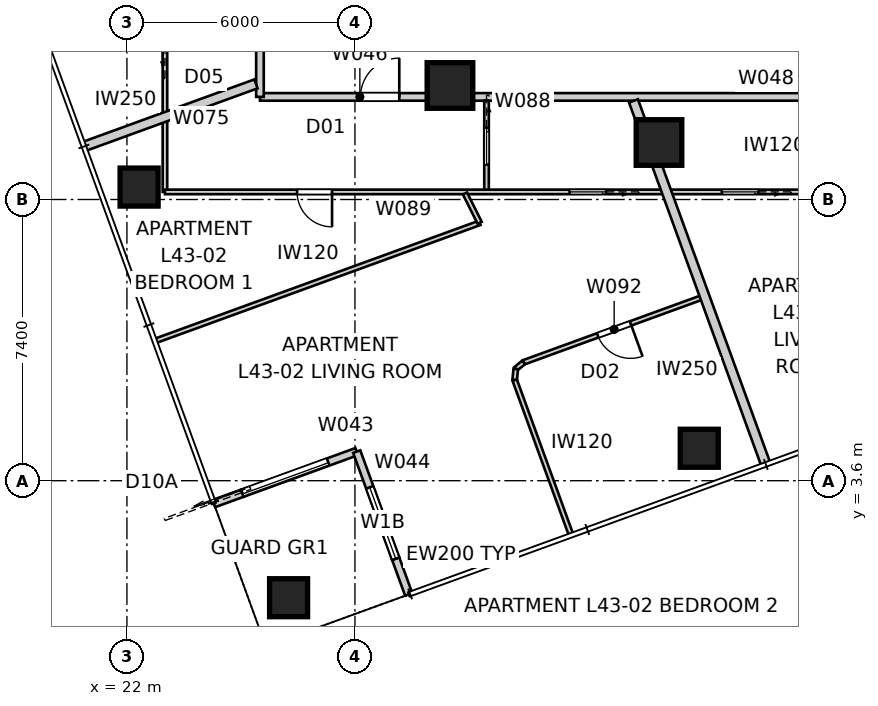
"""IFC4 building model, lengths in metres.
Left out: names, types, materials, properties, quantities, classifications, styles, units other than length and angle.
Written with IfcOpenShell. Run it as: python <this file> out.ifc"""

import sys

from ifc_helpers import new_model, si_unit, direction, frame, frame_2d, origin, origin_2d, place, context, subcontext, project, spatial, rectangle, extrude, element, fill, save


model = new_model("IFC4")
c1 = context("Model", 3, precision=1e-05, world=origin(), true_north=direction((0.0, 1.0)))
c2 = subcontext(c1, "Body", "Model", "MODEL_VIEW")
j1 = project(units=[si_unit("LENGTHUNIT", "METRE"), si_unit("PLANEANGLEUNIT", "RADIAN")], contexts=[c1])
p1 = place(None, origin())
s1 = spatial("IfcSite", under=j1, at=p1, CompositionType="ELEMENT")
p2 = place(p1, origin())
s2 = spatial("IfcBuilding", under=s1, at=p2, CompositionType="ELEMENT")
p3 = place(p2, frame((0.0, 0.0, 157.4)))
s3 = spatial("IfcBuildingStorey", under=s2, at=p3, CompositionType="ELEMENT", Elevation=157.4)
for number, where, z_axis, x_axis in (
    (1, (26.253, 0.521, 0.0), (0.0, 0.0, 1.0), (1.0, 0.0, 0.0)),
    (2, (37.06, 4.454, 0.0), (0.0, 0.0, 1.0), (1.0, 0.0, 0.0)),
    (3, (22.32, 11.327, 0.0), (0.0, 0.0, 1.0), (1.0, 0.0, 0.0)),
):
    element("IfcColumn", number, at=place(p3, frame(where, z_axis=z_axis, x_axis=x_axis)), inside=s3, PredefinedType="COLUMN", context=c2, shape_type="SweptSolid", body=[
        extrude(rectangle(XDim=1.0, YDim=1.0, at=origin_2d()), origin(), (0.0, 0.0, 1.0), 3.4),
    ])
for number, where, z_axis, x_axis in (
    (4, (30.5, 14.0, 0.0), (0.0, 0.0, 1.0), (1.0, 0.0, 0.0)),
    (5, (36.0, 12.5, 0.0), (0.0, 0.0, 1.0), (1.0, 0.0, 0.0)),
):
    element("IfcColumn", number, at=place(p3, frame(where, z_axis=z_axis, x_axis=x_axis)), inside=s3, PredefinedType="COLUMN", context=c2, shape_type="SweptSolid", body=[
        extrude(rectangle(XDim=1.2, YDim=1.2, at=origin_2d()), origin(), (0.0, 0.0, 1.0), 3.4),
    ])
p4 = place(p3, frame((24.288, 2.998, 0.0), z_axis=(0.0, 0.0, 1.0), x_axis=(0.939659694648, 0.342110593602, 0.0)))
e6 = element("IfcWall", 6, at=p4, inside=s3, PredefinedType="SOLIDWALL", context=c2, shape_type="SweptSolid", body=[
    extrude(rectangle(XDim=0.8, YDim=0.2, at=frame_2d((0.4, 0.0))), origin(), (0.0, 0.0, 1.0), 3.25),
])
p5 = place(p3, frame((25.04, 3.271, 0.0), z_axis=(0.0, 0.0, 1.0), x_axis=(0.939693144909, 0.342018703306, 0.0)))
e7 = element("IfcWall", 7, at=p5, inside=s3, PredefinedType="SOLIDWALL", context=c2, shape_type="SweptSolid", body=[
    extrude(rectangle(XDim=3.2, YDim=0.2, at=frame_2d((1.6, 0.0))), origin(), (0.0, 0.0, 1.0), 2.722),
])
p6 = place(p5, origin())
e8 = element("IfcOpeningElement", 8, at=p6, cuts=e7, PredefinedType="OPENING", context=c2, shape_type="SweptSolid", body=[
    extrude(rectangle(XDim=2.4, YDim=2.1, at=frame_2d((1.2, 1.05))), frame((0.0, 0.11, 0.0), z_axis=(0.0, -1.0, 0.0), x_axis=(1.0, 0.0, 0.0)), (0.0, 0.0, 1.0), 0.22),
])
p7 = place(p3, frame((28.047, 4.366, 0.0), z_axis=(0.0, 0.0, 1.0), x_axis=(0.341965219194, -0.939712609717, 0.0)))
e9 = element("IfcWall", 9, at=p7, inside=s3, PredefinedType="SOLIDWALL", context=c2, shape_type="SweptSolid", body=[
    extrude(rectangle(XDim=3.0, YDim=0.2, at=frame_2d((1.5, 0.0))), origin(), (0.0, 0.0, 1.0), 2.722),
])
p8 = place(p7, frame((1.0, 0.0, 0.45)))
e10 = element("IfcOpeningElement", 10, at=p8, cuts=e9, PredefinedType="OPENING", context=c2, shape_type="SweptSolid", body=[
    extrude(rectangle(XDim=2.0, YDim=1.8, at=frame_2d((1.0, 0.9))), frame((0.0, 0.11, 0.0), z_axis=(0.0, -1.0, 0.0), x_axis=(1.0, 0.0, 0.0)), (0.0, 0.0, 1.0), 0.22),
])
p9 = place(p3, frame((29.073, 1.547, 0.0), z_axis=(0.0, 0.0, 1.0), x_axis=(0.342037080957, -0.939686455819, 0.0)))
e11 = element("IfcWall", 11, at=p9, inside=s3, PredefinedType="SOLIDWALL", context=c2, shape_type="SweptSolid", body=[
    extrude(rectangle(XDim=1.0, YDim=0.2, at=frame_2d((0.5, 0.0))), origin(), (0.0, 0.0, 1.0), 3.25),
])
p10 = place(p3, frame((25.5, 13.7, 0.0), z_axis=(0.0, 0.0, 1.0), x_axis=(1.0, 0.0, 0.0)))
e12 = element("IfcWall", 12, at=p10, inside=s3, PredefinedType="PARTITIONING", context=c2, shape_type="SweptSolid", body=[
    extrude(rectangle(XDim=5.258, YDim=0.2, at=frame_2d((2.629, 0.0))), origin(), (0.0, 0.0, 1.0), 3.25),
])
p11 = place(p10, frame((2.646, 0.0, 0.0)))
e13 = element("IfcOpeningElement", 13, at=p11, cuts=e12, PredefinedType="OPENING", context=c2, shape_type="SweptSolid", body=[
    extrude(rectangle(XDim=1.02, YDim=2.34, at=frame_2d((0.51, 1.17))), frame((0.0, 0.11, 0.0), z_axis=(0.0, -1.0, 0.0), x_axis=(1.0, 0.0, 0.0)), (0.0, 0.0, 1.0), 0.22),
])
p12 = place(p3, frame((30.758, 13.7, 0.0), z_axis=(0.0, 0.0, 1.0), x_axis=(1.0, 0.0, 0.0)))
e14 = element("IfcWall", 14, at=p12, inside=s3, PredefinedType="PARTITIONING", context=c2, shape_type="SweptSolid", body=[
    extrude(rectangle(XDim=1.683, YDim=0.2, at=frame_2d((0.842, 0.0))), origin(), (0.0, 0.0, 1.0), 2.55),
])
p13 = place(p3, frame((32.442, 13.7, 0.0), z_axis=(0.0, 0.0, 1.0), x_axis=(1.0, 0.0, 0.0)))
e15 = element("IfcWall", 15, at=p13, inside=s3, PredefinedType="PARTITIONING", context=c2, shape_type="SweptSolid", body=[
    extrude(rectangle(XDim=15.117, YDim=0.2, at=frame_2d((7.558, 0.0))), origin(), (0.0, 0.0, 1.0), 3.25),
])
p14 = place(p13, frame((12.755, 0.0, 0.0)))
e16 = element("IfcOpeningElement", 16, at=p14, cuts=e15, PredefinedType="OPENING", context=c2, shape_type="SweptSolid", body=[
    extrude(rectangle(XDim=1.02, YDim=2.34, at=frame_2d((0.51, 1.17))), frame((0.0, 0.11, 0.0), z_axis=(0.0, -1.0, 0.0), x_axis=(1.0, 0.0, 0.0)), (0.0, 0.0, 1.0), 0.22),
])
p15 = place(p3, frame((25.5, 47.1, 0.0), z_axis=(0.0, 0.0, 1.0), x_axis=(0.0, -1.0, 0.0)))
e17 = element("IfcWall", 17, at=p15, inside=s3, PredefinedType="PARTITIONING", context=c2, shape_type="SweptSolid", body=[
    extrude(rectangle(XDim=33.4, YDim=0.2, at=frame_2d((16.7, 0.0))), origin(), (0.0, 0.0, 1.0), 3.25),
])
p16 = place(p15, frame((2.52, 0.0, 0.0)))
e18 = element("IfcOpeningElement", 18, at=p16, cuts=e17, PredefinedType="OPENING", context=c2, shape_type="SweptSolid", body=[
    extrude(rectangle(XDim=1.02, YDim=2.34, at=frame_2d((0.51, 1.17))), frame((0.0, 0.11, 0.0), z_axis=(0.0, -1.0, 0.0), x_axis=(1.0, 0.0, 0.0)), (0.0, 0.0, 1.0), 0.22),
])
p17 = place(p15, frame((27.383, 0.0, 0.0)))
e19 = element("IfcOpeningElement", 19, at=p17, cuts=e17, PredefinedType="OPENING", context=c2, shape_type="SweptSolid", body=[
    extrude(rectangle(XDim=1.02, YDim=2.1, at=frame_2d((0.51, 1.05))), frame((0.0, 0.11, 0.0), z_axis=(0.0, -1.0, 0.0), x_axis=(1.0, 0.0, 0.0)), (0.0, 0.0, 1.0), 0.22),
])
p18 = place(p3, frame((38.812, 4.027, 0.0), z_axis=(0.0, 0.0, 1.0), x_axis=(-0.342027987857, 0.939689765573, 0.0)))
e20 = element("IfcWall", 20, at=p18, inside=s3, PredefinedType="PARTITIONING", context=c2, shape_type="SweptSolid", body=[
    extrude(rectangle(XDim=10.182, YDim=0.25, at=frame_2d((5.091, 0.0))), origin(), (0.0, 0.0, 1.0), 3.25),
])
p19 = place(p3, frame((20.868, 12.395, 0.0), z_axis=(0.0, 0.0, 1.0), x_axis=(0.939677962656, 0.342060413521, 0.0)))
e21 = element("IfcWall", 21, at=p19, inside=s3, PredefinedType="PARTITIONING", context=c2, shape_type="SweptSolid", body=[
    extrude(rectangle(XDim=4.818, YDim=0.25, at=frame_2d((2.409, 0.0))), origin(), (0.0, 0.0, 1.0), 3.25),
])
p20 = place(p3, frame((23.0, 11.2, 0.0), z_axis=(0.0, 0.0, 1.0), x_axis=(0.0, 1.0, 0.0)))
e22 = element("IfcWall", 22, at=p20, inside=s3, PredefinedType="PARTITIONING", context=c2, shape_type="SweptSolid", body=[
    extrude(rectangle(XDim=8.1, YDim=0.12, at=frame_2d((4.05, 0.0))), origin(), (0.0, 0.0, 1.0), 3.25),
])
p21 = place(p20, frame((3.849, 0.0, 0.0)))
e23 = element("IfcOpeningElement", 23, at=p21, cuts=e22, PredefinedType="OPENING", context=c2, shape_type="SweptSolid", body=[
    extrude(rectangle(XDim=0.96, YDim=2.1, at=frame_2d((0.48, 1.05))), frame((0.0, 0.07, 0.0), z_axis=(0.0, -1.0, 0.0), x_axis=(1.0, 0.0, 0.0)), (0.0, 0.0, 1.0), 0.14),
])
p22 = place(p3, frame((31.462, 13.6, 0.0), z_axis=(0.0, 0.0, 1.0), x_axis=(0.0, -1.0, 0.0)))
e24 = element("IfcWall", 24, at=p22, inside=s3, PredefinedType="PARTITIONING", context=c2, shape_type="SweptSolid", body=[
    extrude(rectangle(XDim=2.4, YDim=0.12, at=frame_2d((1.2, 0.0))), origin(), (0.0, 0.0, 1.0), 3.25),
])
p23 = place(p22, frame((0.72, 0.0, 0.0)))
e25 = element("IfcOpeningElement", 25, at=p23, cuts=e24, PredefinedType="OPENING", context=c2, shape_type="SweptSolid", body=[
    extrude(rectangle(XDim=0.96, YDim=2.1, at=frame_2d((0.48, 1.05))), frame((0.0, 0.07, 0.0), z_axis=(0.0, -1.0, 0.0), x_axis=(1.0, 0.0, 0.0)), (0.0, 0.0, 1.0), 0.14),
])
p24 = place(p3, frame((43.098, 11.2, 0.0), z_axis=(0.0, 0.0, 1.0), x_axis=(-1.0, 0.0, 0.0)))
e26 = element("IfcWall", 26, at=p24, inside=s3, PredefinedType="PARTITIONING", context=c2, shape_type="SweptSolid", body=[
    extrude(rectangle(XDim=20.098, YDim=0.12, at=frame_2d((10.049, 0.0))), origin(), (0.0, 0.0, 1.0), 3.25),
])
p25 = place(p24, frame((15.701, 0.0, 0.0)))
e27 = element("IfcOpeningElement", 27, at=p25, cuts=e26, PredefinedType="OPENING", context=c2, shape_type="SweptSolid", body=[
    extrude(rectangle(XDim=0.92, YDim=2.34, at=frame_2d((0.46, 1.17))), frame((0.0, 0.07, 0.0), z_axis=(0.0, -1.0, 0.0), x_axis=(1.0, 0.0, 0.0)), (0.0, 0.0, 1.0), 0.14),
])
p26 = place(p24, frame((8.49, 0.0, 0.0)))
e28 = element("IfcOpeningElement", 28, at=p26, cuts=e26, PredefinedType="OPENING", context=c2, shape_type="SweptSolid", body=[
    extrude(rectangle(XDim=0.96, YDim=2.1, at=frame_2d((0.48, 1.05))), frame((0.0, 0.07, 0.0), z_axis=(0.0, -1.0, 0.0), x_axis=(1.0, 0.0, 0.0)), (0.0, 0.0, 1.0), 0.14),
])
p27 = place(p24, frame((0.185, 0.0, 0.0)))
e29 = element("IfcOpeningElement", 29, at=p27, cuts=e26, PredefinedType="OPENING", context=c2, shape_type="SweptSolid", body=[
    extrude(rectangle(XDim=0.96, YDim=2.1, at=frame_2d((0.48, 1.05))), frame((0.0, 0.07, 0.0), z_axis=(0.0, -1.0, 0.0), x_axis=(1.0, 0.0, 0.0)), (0.0, 0.0, 1.0), 0.14),
])
p28 = place(p24, frame((4.484, 0.0, 0.0)))
e30 = element("IfcOpeningElement", 30, at=p28, cuts=e26, PredefinedType="OPENING", context=c2, shape_type="SweptSolid", body=[
    extrude(rectangle(XDim=0.96, YDim=2.1, at=frame_2d((0.48, 1.05))), frame((0.0, 0.07, 0.0), z_axis=(0.0, -1.0, 0.0), x_axis=(1.0, 0.0, 0.0)), (0.0, 0.0, 1.0), 0.14),
])
p29 = place(p3, frame((22.769, 7.287, 0.0), z_axis=(0.0, 0.0, 1.0), x_axis=(0.939692673089, 0.342019999623, 0.0)))
e31 = element("IfcWall", 31, at=p29, inside=s3, PredefinedType="PARTITIONING", context=c2, shape_type="SweptSolid", body=[
    extrude(rectangle(XDim=9.06, YDim=0.12, at=frame_2d((4.53, 0.0))), origin(), (0.0, 0.0, 1.0), 3.25),
])
p30 = place(p3, frame((31.283, 10.385, 0.0), z_axis=(0.0, 0.0, 1.0), x_axis=(-0.448117513314, 0.893974660861, 0.0)))
e32 = element("IfcWall", 32, at=p30, inside=s3, PredefinedType="PARTITIONING", context=c2, shape_type="SweptSolid", body=[
    extrude(rectangle(XDim=0.864, YDim=0.12, at=frame_2d((0.432, 0.0))), origin(), (0.0, 0.0, 1.0), 3.25),
])
p31 = place(p3, frame((37.202, 8.449, 0.0), z_axis=(0.0, 0.0, 1.0), x_axis=(-0.939692115443, -0.34202153174, 0.0)))
e33 = element("IfcWall", 33, at=p31, inside=s3, PredefinedType="PARTITIONING", context=c2, shape_type="SweptSolid", body=[
    extrude(rectangle(XDim=5.068, YDim=0.12, at=frame_2d((2.534, 0.0))), origin(), (0.0, 0.0, 1.0), 3.25),
])
p32 = place(p31, frame((2.074, 0.0, 0.0)))
e34 = element("IfcOpeningElement", 34, at=p32, cuts=e33, PredefinedType="OPENING", context=c2, shape_type="SweptSolid", body=[
    extrude(rectangle(XDim=0.92, YDim=2.34, at=frame_2d((0.46, 1.17))), frame((0.0, 0.07, 0.0), z_axis=(0.0, -1.0, 0.0), x_axis=(1.0, 0.0, 0.0)), (0.0, 0.0, 1.0), 0.14),
])
p33 = place(p3, frame((32.44, 6.715, 0.0), z_axis=(0.0, 0.0, 1.0), x_axis=(-0.769401529914, -0.638765438769, 0.0)))
e35 = element("IfcWall", 35, at=p33, inside=s3, PredefinedType="PARTITIONING", context=c2, shape_type="SweptSolid", body=[
    extrude(rectangle(XDim=0.271, YDim=0.12, at=frame_2d((0.135, 0.0))), origin(), (0.0, 0.0, 1.0), 3.25),
])
p34 = place(p3, frame((32.231, 6.542, 0.0), z_axis=(0.0, 0.0, 1.0), x_axis=(-0.093212941297, -0.995646195983, 0.0)))
e36 = element("IfcWall", 36, at=p34, inside=s3, PredefinedType="PARTITIONING", context=c2, shape_type="SweptSolid", body=[
    extrude(rectangle(XDim=0.296, YDim=0.12, at=frame_2d((0.148, 0.0))), origin(), (0.0, 0.0, 1.0), 3.25),
])
p35 = place(p3, frame((32.204, 6.248, 0.0), z_axis=(0.0, 0.0, 1.0), x_axis=(0.342011603146, -0.939695729113, 0.0)))
e37 = element("IfcWall", 37, at=p35, inside=s3, PredefinedType="PARTITIONING", context=c2, shape_type="SweptSolid", body=[
    extrude(rectangle(XDim=4.307, YDim=0.12, at=frame_2d((2.153, 0.0))), origin(), (0.0, 0.0, 1.0), 3.25),
])
p36 = place(p6, origin())
e38 = element("IfcDoor", 38, at=p36, inside=s3, OperationType="SLIDING_TO_LEFT", PredefinedType="DOOR", context=c2, shape_type="SweptSolid", body=[
    extrude(rectangle(XDim=2.4, YDim=2.1, at=frame_2d((1.2, 1.05))), frame((0.0, 0.025, 0.0), z_axis=(0.0, -1.0, 0.0), x_axis=(1.0, 0.0, 0.0)), (0.0, 0.0, 1.0), 0.05),
])
fill(e8, e38)
p37 = place(p8, origin())
e39 = element("IfcWindow", 39, at=p37, inside=s3, PartitioningType="SINGLE_PANEL", PredefinedType="WINDOW", context=c2, shape_type="SweptSolid", body=[
    extrude(rectangle(XDim=2.0, YDim=1.8, at=frame_2d((1.0, 0.9))), frame((0.0, 0.03, 0.0), z_axis=(0.0, -1.0, 0.0), x_axis=(1.0, 0.0, 0.0)), (0.0, 0.0, 1.0), 0.06),
])
fill(e10, e39)
p38 = place(p11, origin())
e40 = element("IfcDoor", 40, at=p38, inside=s3, OperationType="SINGLE_SWING_RIGHT", PredefinedType="DOOR", context=c2, shape_type="SweptSolid", body=[
    extrude(rectangle(XDim=1.02, YDim=2.34, at=frame_2d((0.51, 1.17))), frame((0.0, 0.025, 0.0), z_axis=(0.0, -1.0, 0.0), x_axis=(1.0, 0.0, 0.0)), (0.0, 0.0, 1.0), 0.05),
])
fill(e13, e40)
p39 = place(p25, origin())
e41 = element("IfcDoor", 41, at=p39, inside=s3, OperationType="SINGLE_SWING_LEFT", PredefinedType="DOOR", context=c2, shape_type="SweptSolid", body=[
    extrude(rectangle(XDim=0.92, YDim=2.34, at=frame_2d((0.46, 1.17))), frame((0.0, 0.025, 0.0), z_axis=(0.0, -1.0, 0.0), x_axis=(1.0, 0.0, 0.0)), (0.0, 0.0, 1.0), 0.05),
])
fill(e27, e41)
p40 = place(p23, origin())
e42 = element("IfcDoor", 42, at=p40, inside=s3, OperationType="SLIDING_TO_LEFT", PredefinedType="DOOR", context=c2, shape_type="SweptSolid", body=[
    extrude(rectangle(XDim=0.96, YDim=2.1, at=frame_2d((0.48, 1.05))), frame((0.0, 0.025, 0.0), z_axis=(0.0, -1.0, 0.0), x_axis=(1.0, 0.0, 0.0)), (0.0, 0.0, 1.0), 0.05),
])
fill(e25, e42)
p41 = place(p26, origin())
e43 = element("IfcDoor", 43, at=p41, inside=s3, OperationType="SLIDING_TO_LEFT", PredefinedType="DOOR", context=c2, shape_type="SweptSolid", body=[
    extrude(rectangle(XDim=0.96, YDim=2.1, at=frame_2d((0.48, 1.05))), frame((0.0, 0.025, 0.0), z_axis=(0.0, -1.0, 0.0), x_axis=(1.0, 0.0, 0.0)), (0.0, 0.0, 1.0), 0.05),
])
fill(e28, e43)
p42 = place(p32, origin())
e44 = element("IfcDoor", 44, at=p42, inside=s3, OperationType="SINGLE_SWING_LEFT", PredefinedType="DOOR", context=c2, shape_type="SweptSolid", body=[
    extrude(rectangle(XDim=0.92, YDim=2.34, at=frame_2d((0.46, 1.17))), frame((0.0, 0.025, 0.0), z_axis=(0.0, -1.0, 0.0), x_axis=(1.0, 0.0, 0.0)), (0.0, 0.0, 1.0), 0.05),
])
fill(e34, e44)
p43 = place(p28, origin())
e45 = element("IfcDoor", 45, at=p43, inside=s3, OperationType="SLIDING_TO_LEFT", PredefinedType="DOOR", context=c2, shape_type="SweptSolid", body=[
    extrude(rectangle(XDim=0.96, YDim=2.1, at=frame_2d((0.48, 1.05))), frame((0.0, 0.025, 0.0), z_axis=(0.0, -1.0, 0.0), x_axis=(1.0, 0.0, 0.0)), (0.0, 0.0, 1.0), 0.05),
])
fill(e30, e45)
save(model, sys.argv[1])
